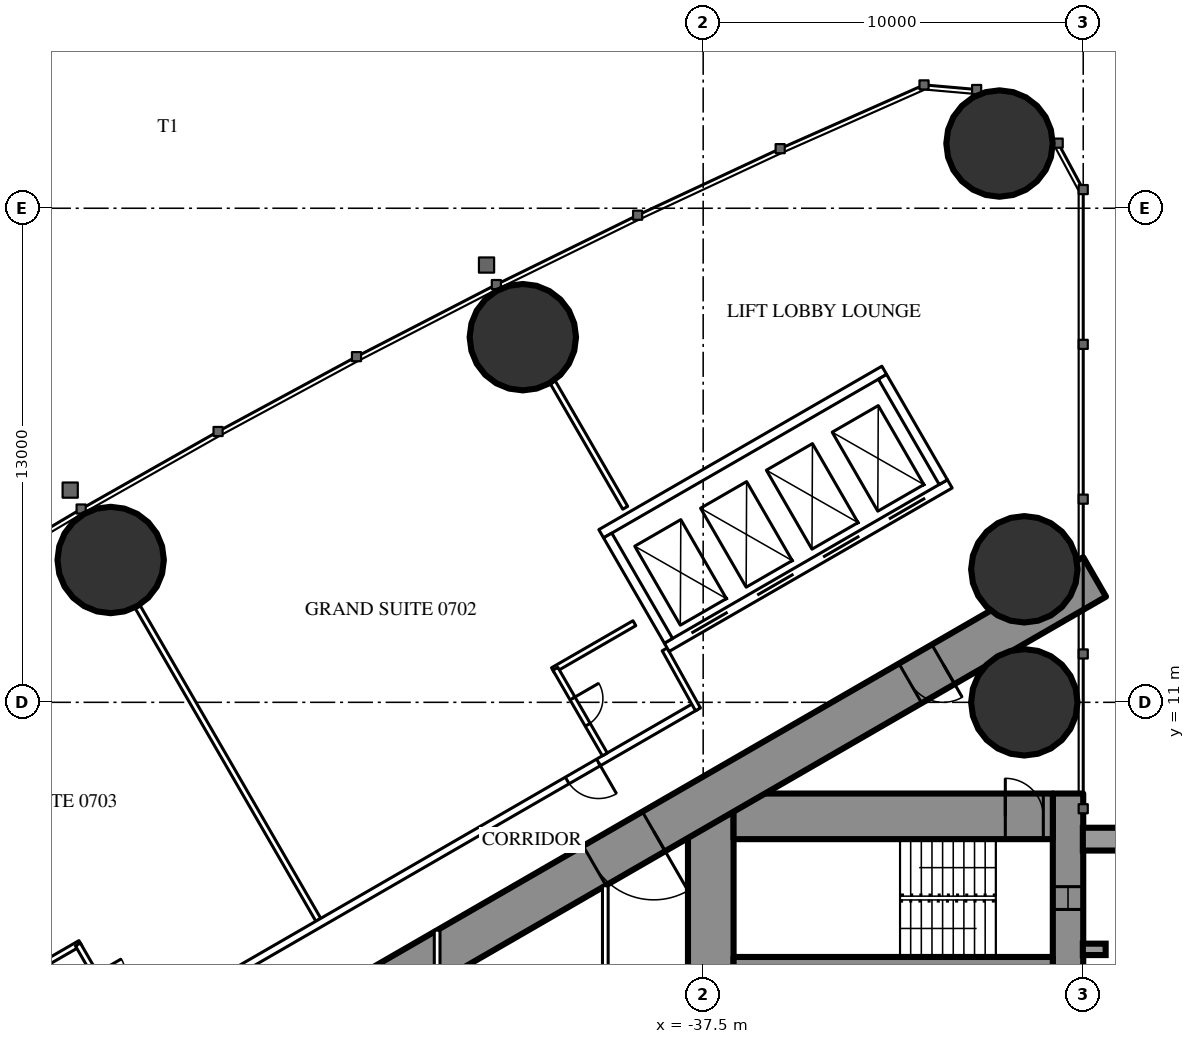
"""IFC4 building model, lengths in metres.
Left out: names, types, materials, properties, quantities, classifications, styles, units other than length and angle.
Written with IfcOpenShell. Run it as: python <this file> out.ifc"""

import sys

from ifc_helpers import new_model, si_unit, direction, frame, frame_2d, origin, origin_2d, place, context, subcontext, project, spatial, rectangle, hollow_circle, extrude, element, fill, save


model = new_model("IFC4")
c1 = context("Model", 3, precision=1e-05, world=origin(), true_north=direction((0.0, 1.0)))
c2 = subcontext(c1, "Body", "Model", "MODEL_VIEW")
j1 = project(units=[si_unit("LENGTHUNIT", "METRE"), si_unit("PLANEANGLEUNIT", "RADIAN")], contexts=[c1])
p1 = place(None, origin())
s1 = spatial("IfcSite", under=j1, at=p1, CompositionType="ELEMENT")
p2 = place(p1, origin())
s2 = spatial("IfcBuilding", under=s1, at=p2, CompositionType="ELEMENT")
p3 = place(p2, frame((0.0, 0.0, 32.0)))
s3 = spatial("IfcBuildingStorey", under=s2, at=p3, CompositionType="ELEMENT", Elevation=32.0)
for number, where, z_axis, x_axis in (
    (1, (-29.703, 25.703, 0.0), (0.0, 0.0, 1.0), (1.0, 0.0, 0.0)),
    (2, (-29.05, 11.0, 0.0), (0.0, 0.0, 1.0), (1.0, 0.0, 0.0)),
    (3, (-29.05, 14.5, 0.0), (0.0, 0.0, 1.0), (1.0, 0.0, 0.0)),
    (4, (-42.245, 20.607, 0.0), (0.0, 0.0, 1.0), (1.0, 0.0, 0.0)),
    (5, (-53.09, 14.745, 0.0), (0.0, 0.0, 1.0), (1.0, 0.0, 0.0)),
):
    element("IfcColumn", number, at=place(p3, frame(where, z_axis=z_axis, x_axis=x_axis)), inside=s3, PredefinedType="COLUMN", context=c2, shape_type="SweptSolid", body=[
        extrude(hollow_circle(Radius=1.4, WallThickness=0.12, at=origin_2d()), origin(), (0.0, 0.0, 1.0), 3.5),
    ])
p4 = place(p3, frame((-27.9, 8.6, 0.0), z_axis=(0.0, 0.0, 1.0), x_axis=(0.0, -1.0, 0.0)))
e6 = element("IfcWall", 6, at=p4, inside=s3, PredefinedType="SHEAR", context=c2, shape_type="SweptSolid", body=[
    extrude(rectangle(XDim=17.2, YDim=0.8, at=frame_2d((8.6, 0.0))), origin(), (0.0, 0.0, 1.0), 3.5),
])
p5 = place(p4, frame((2.45, 0.0, 0.6)))
e7 = element("IfcOpeningElement", 7, at=p5, cuts=e6, PredefinedType="OPENING", context=c2, shape_type="SweptSolid", body=[
    extrude(rectangle(XDim=0.6, YDim=2.1, at=frame_2d((0.3, 1.05))), frame((0.0, 0.41, 0.0), z_axis=(0.0, -1.0, 0.0), x_axis=(1.0, 0.0, 0.0)), (0.0, 0.0, 1.0), 0.82),
])
p6 = place(p4, frame((14.15, 0.0, 0.6)))
e8 = element("IfcOpeningElement", 8, at=p6, cuts=e6, PredefinedType="OPENING", context=c2, shape_type="SweptSolid", body=[
    extrude(rectangle(XDim=0.6, YDim=2.1, at=frame_2d((0.3, 1.05))), frame((0.0, 0.41, 0.0), z_axis=(0.0, -1.0, 0.0), x_axis=(1.0, 0.0, 0.0)), (0.0, 0.0, 1.0), 0.82),
])
p7 = place(p3, frame((-37.3, 8.6, 0.0), z_axis=(0.0, 0.0, 1.0), x_axis=(0.0, -1.0, 0.0)))
e9 = element("IfcWall", 9, at=p7, inside=s3, PredefinedType="SHEAR", context=c2, shape_type="SweptSolid", body=[
    extrude(rectangle(XDim=17.2, YDim=1.2, at=frame_2d((8.6, 0.0))), origin(), (0.0, 0.0, 1.0), 3.5),
])
p8 = place(p7, frame((7.7, 0.0, 0.0)))
e10 = element("IfcOpeningElement", 10, at=p8, cuts=e9, PredefinedType="OPENING", context=c2, shape_type="SweptSolid", body=[
    extrude(rectangle(XDim=1.8, YDim=2.2, at=frame_2d((0.9, 1.1))), frame((0.0, 0.61, 0.0), z_axis=(0.0, -1.0, 0.0), x_axis=(1.0, 0.0, 0.0)), (0.0, 0.0, 1.0), 1.22),
])
p9 = place(p3, frame((-28.3, 8.0, 0.0), z_axis=(0.0, 0.0, 1.0), x_axis=(-1.0, 0.0, 0.0)))
e11 = element("IfcWall", 11, at=p9, inside=s3, PredefinedType="SHEAR", context=c2, shape_type="SweptSolid", body=[
    extrude(rectangle(XDim=8.4, YDim=1.2, at=frame_2d((4.2, 0.0))), origin(), (0.0, 0.0, 1.0), 3.5),
])
p10 = place(p9, frame((0.25, 0.0, 0.0)))
e12 = element("IfcOpeningElement", 12, at=p10, cuts=e11, PredefinedType="OPENING", context=c2, shape_type="SweptSolid", body=[
    extrude(rectangle(XDim=1.0, YDim=2.2, at=frame_2d((0.5, 1.1))), frame((0.0, 0.61, 0.0), z_axis=(0.0, -1.0, 0.0), x_axis=(1.0, 0.0, 0.0)), (0.0, 0.0, 1.0), 1.22),
])
p11 = place(p3, frame((-28.3, 4.15, 0.0), z_axis=(0.0, 0.0, 1.0), x_axis=(-1.0, 0.0, 0.0)))
e13 = element("IfcWall", 13, at=p11, inside=s3, PredefinedType="SHEAR", context=c2, shape_type="SweptSolid", body=[
    extrude(rectangle(XDim=8.4, YDim=0.3, at=frame_2d((4.2, 0.0))), origin(), (0.0, 0.0, 1.0), 3.5),
])
p12 = place(p3, frame((-27.2, 14.3, 0.0), z_axis=(0.0, 0.0, 1.0), x_axis=(-0.866026593062, -0.499997940104, 0.0)))
e14 = element("IfcWall", 14, at=p12, inside=s3, PredefinedType="SHEAR", context=c2, shape_type="SweptSolid", body=[
    extrude(rectangle(XDim=28.946, YDim=1.2, at=frame_2d((14.473, 0.0))), origin(), (0.0, 0.0, 1.0), 3.5),
])
p13 = place(p12, frame((4.6, 0.0, 0.0)))
e15 = element("IfcOpeningElement", 15, at=p13, cuts=e14, PredefinedType="OPENING", context=c2, shape_type="SweptSolid", body=[
    extrude(rectangle(XDim=1.0, YDim=2.2, at=frame_2d((0.5, 1.1))), frame((0.0, 0.61, 0.0), z_axis=(0.0, -1.0, 0.0), x_axis=(1.0, 0.0, 0.0)), (0.0, 0.0, 1.0), 1.22),
])
p14 = place(p12, frame((13.395, 0.0, 0.0)))
e16 = element("IfcOpeningElement", 16, at=p14, cuts=e14, PredefinedType="OPENING", context=c2, shape_type="SweptSolid", body=[
    extrude(rectangle(XDim=1.8, YDim=2.2, at=frame_2d((0.9, 1.1))), frame((0.0, 0.61, 0.0), z_axis=(0.0, -1.0, 0.0), x_axis=(1.0, 0.0, 0.0)), (0.0, 0.0, 1.0), 1.22),
])
p15 = place(p3, frame((-47.627, 5.278, 0.0), z_axis=(0.0, 0.0, 1.0), x_axis=(-0.500009844318, 0.86601972009, 0.0)))
e17 = element("IfcWall", 17, at=p15, inside=s3, PredefinedType="PARTITIONING", context=c2, shape_type="SweptSolid", body=[
    extrude(rectangle(XDim=9.51, YDim=0.15, at=frame_2d((4.755, 0.0))), origin(), (0.0, 0.0, 1.0), 2.25),
])
p16 = place(p3, frame((-39.551, 16.119, 0.0), z_axis=(0.0, 0.0, 1.0), x_axis=(-0.500014214979, 0.866017196607, 0.0)))
e18 = element("IfcWall", 18, at=p16, inside=s3, PredefinedType="PARTITIONING", context=c2, shape_type="SweptSolid", body=[
    extrude(rectangle(XDim=3.815, YDim=0.15, at=frame_2d((1.907, 0.0))), origin(), (0.0, 0.0, 1.0), 3.25),
])
p17 = place(p3, frame((-37.7, 10.894, 0.0), z_axis=(0.0, 0.0, 1.0), x_axis=(-0.866027905338, -0.499995667157, 0.0)))
e19 = element("IfcWall", 19, at=p17, inside=s3, PredefinedType="PARTITIONING", context=c2, shape_type="SweptSolid", body=[
    extrude(rectangle(XDim=21.787, YDim=0.2, at=frame_2d((10.894, 0.0))), origin(), (0.0, 0.0, 1.0), 3.25),
])
p18 = place(p17, frame((16.008, 0.0, 0.0)))
e20 = element("IfcOpeningElement", 20, at=p18, cuts=e19, PredefinedType="OPENING", context=c2, shape_type="SweptSolid", body=[
    extrude(rectangle(XDim=0.95, YDim=2.2, at=frame_2d((0.475, 1.1))), frame((0.0, 0.11, 0.0), z_axis=(0.0, -1.0, 0.0), x_axis=(1.0, 0.0, 0.0)), (0.0, 0.0, 1.0), 0.22),
])
p19 = place(p17, frame((20.058, 0.0, 0.0)))
e21 = element("IfcOpeningElement", 21, at=p19, cuts=e19, PredefinedType="OPENING", context=c2, shape_type="SweptSolid", body=[
    extrude(rectangle(XDim=0.95, YDim=2.2, at=frame_2d((0.475, 1.1))), frame((0.0, 0.11, 0.0), z_axis=(0.0, -1.0, 0.0), x_axis=(1.0, 0.0, 0.0)), (0.0, 0.0, 1.0), 0.22),
])
p20 = place(p17, frame((2.95, 0.0, 0.0)))
e22 = element("IfcOpeningElement", 22, at=p20, cuts=e19, PredefinedType="OPENING", context=c2, shape_type="SweptSolid", body=[
    extrude(rectangle(XDim=0.95, YDim=2.2, at=frame_2d((0.475, 1.1))), frame((0.0, 0.11, 0.0), z_axis=(0.0, -1.0, 0.0), x_axis=(1.0, 0.0, 0.0)), (0.0, 0.0, 1.0), 0.22),
])
p21 = place(p3, frame((-38.513, 12.392, 0.0), z_axis=(0.0, 0.0, 1.0), x_axis=(0.485585508183, -0.874189175317, 0.0)))
e23 = element("IfcWall", 23, at=p21, inside=s3, PredefinedType="PARTITIONING", context=c2, shape_type="SweptSolid", body=[
    extrude(rectangle(XDim=1.805, YDim=0.15, at=frame_2d((0.902, 0.0))), origin(), (0.0, 0.0, 1.0), 3.25),
])
p22 = place(p3, frame((-53.888, 4.665, 0.0), z_axis=(0.0, 0.0, 1.0), x_axis=(-0.866006523861, -0.500032699561, 0.0)))
e24 = element("IfcWall", 24, at=p22, inside=s3, PredefinedType="PARTITIONING", context=c2, shape_type="SweptSolid", body=[
    extrude(rectangle(XDim=2.475, YDim=0.15, at=frame_2d((1.237, 0.0))), origin(), (0.0, 0.0, 1.0), 3.25),
])
p23 = place(p3, frame((-52.653, 2.376, 0.0), z_axis=(0.0, 0.0, 1.0), x_axis=(-0.500006934395, 0.866021400173, 0.0)))
e25 = element("IfcWall", 25, at=p23, inside=s3, PredefinedType="PARTITIONING", context=c2, shape_type="SweptSolid", body=[
    extrude(rectangle(XDim=2.6, YDim=0.15, at=frame_2d((1.3, 0.0))), origin(), (0.0, 0.0, 1.0), 3.25),
])
p24 = place(p23, frame((0.9, 0.0, 0.0)))
e26 = element("IfcOpeningElement", 26, at=p24, cuts=e25, PredefinedType="OPENING", context=c2, shape_type="SweptSolid", body=[
    extrude(rectangle(XDim=0.8, YDim=2.2, at=frame_2d((0.4, 1.1))), frame((0.0, 0.085, 0.0), z_axis=(0.0, -1.0, 0.0), x_axis=(1.0, 0.0, 0.0)), (0.0, 0.0, 1.0), 0.17),
])
p25 = place(p3, frame((-39.31, 13.082, 0.0), z_axis=(0.0, 0.0, 1.0), x_axis=(-0.866031185235, -0.4999899861, 0.0)))
e27 = element("IfcWall", 27, at=p25, inside=s3, PredefinedType="PARTITIONING", context=c2, shape_type="SweptSolid", body=[
    extrude(rectangle(XDim=2.475, YDim=0.15, at=frame_2d((1.238, 0.0))), origin(), (0.0, 0.0, 1.0), 3.25),
])
p26 = place(p3, frame((-40.088, 9.63, 0.0), z_axis=(0.0, 0.0, 1.0), x_axis=(-0.500006934395, 0.866021400173, 0.0)))
e28 = element("IfcWall", 28, at=p26, inside=s3, PredefinedType="PARTITIONING", context=c2, shape_type="SweptSolid", body=[
    extrude(rectangle(XDim=2.6, YDim=0.15, at=frame_2d((1.3, 0.0))), origin(), (0.0, 0.0, 1.0), 3.25),
])
p27 = place(p26, frame((0.9, 0.0, 0.0)))
e29 = element("IfcOpeningElement", 29, at=p27, cuts=e28, PredefinedType="OPENING", context=c2, shape_type="SweptSolid", body=[
    extrude(rectangle(XDim=0.8, YDim=2.2, at=frame_2d((0.4, 1.1))), frame((0.0, 0.085, 0.0), z_axis=(0.0, -1.0, 0.0), x_axis=(1.0, 0.0, 0.0)), (0.0, 0.0, 1.0), 0.17),
])
p28 = place(p3, frame((-40.075, 6.174, 0.0), z_axis=(0.0, 0.0, 1.0), x_axis=(0.0, -1.0, 0.0)))
e30 = element("IfcWall", 30, at=p28, inside=s3, PredefinedType="PARTITIONING", context=c2, shape_type="SweptSolid", body=[
    extrude(rectangle(XDim=7.374, YDim=0.15, at=frame_2d((3.687, 0.0))), origin(), (0.0, 0.0, 1.0), 3.25),
])
p29 = place(p28, frame((2.787, 0.0, 0.0)))
e31 = element("IfcOpeningElement", 31, at=p29, cuts=e30, PredefinedType="OPENING", context=c2, shape_type="SweptSolid", body=[
    extrude(rectangle(XDim=1.8, YDim=2.2, at=frame_2d((0.9, 1.1))), frame((0.0, 0.085, 0.0), z_axis=(0.0, -1.0, 0.0), x_axis=(1.0, 0.0, 0.0)), (0.0, 0.0, 1.0), 0.17),
])
p30 = place(p3, frame((-44.5, 5.005, 0.0), z_axis=(0.0, 0.0, 1.0), x_axis=(0.0, -1.0, 0.0)))
e32 = element("IfcWall", 32, at=p30, inside=s3, PredefinedType="PARTITIONING", context=c2, shape_type="SweptSolid", body=[
    extrude(rectangle(XDim=10.009, YDim=0.15, at=frame_2d((5.005, 0.0))), origin(), (0.0, 0.0, 1.0), 2.45),
])
p31 = place(p30, frame((2.002, 0.0, 0.0)))
e33 = element("IfcOpeningElement", 33, at=p31, cuts=e32, PredefinedType="OPENING", context=c2, shape_type="SweptSolid", body=[
    extrude(rectangle(XDim=1.0, YDim=2.2, at=frame_2d((0.5, 1.1))), frame((0.0, 0.085, 0.0), z_axis=(0.0, -1.0, 0.0), x_axis=(1.0, 0.0, 0.0)), (0.0, 0.0, 1.0), 0.17),
])
p32 = place(p30, frame((7.007, 0.0, 0.0)))
e34 = element("IfcOpeningElement", 34, at=p32, cuts=e32, PredefinedType="OPENING", context=c2, shape_type="SweptSolid", body=[
    extrude(rectangle(XDim=1.0, YDim=2.2, at=frame_2d((0.5, 1.1))), frame((0.0, 0.085, 0.0), z_axis=(0.0, -1.0, 0.0), x_axis=(1.0, 0.0, 0.0)), (0.0, 0.0, 1.0), 0.17),
])
p33 = place(p3, frame((-31.01, 16.747, 0.0), z_axis=(0.0, 0.0, 1.0), x_axis=(-0.866028165386, -0.499995216735, 0.0)))
e35 = element("IfcWall", 35, at=p33, inside=s3, PredefinedType="PARTITIONING", context=c2, shape_type="SweptSolid", body=[
    extrude(rectangle(XDim=8.6, YDim=0.25, at=frame_2d((4.3, 0.0))), origin(), (0.0, 0.0, 1.0), 3.25),
])
p34 = place(p33, frame((0.75, 0.0, 0.0)))
e36 = element("IfcOpeningElement", 36, at=p34, cuts=e35, PredefinedType="OPENING", context=c2, shape_type="SweptSolid", body=[
    extrude(rectangle(XDim=1.1, YDim=2.2, at=frame_2d((0.55, 1.1))), frame((0.0, 0.135, 0.0), z_axis=(0.0, -1.0, 0.0), x_axis=(1.0, 0.0, 0.0)), (0.0, 0.0, 1.0), 0.27),
])
p35 = place(p33, frame((2.75, 0.0, 0.0)))
e37 = element("IfcOpeningElement", 37, at=p35, cuts=e35, PredefinedType="OPENING", context=c2, shape_type="SweptSolid", body=[
    extrude(rectangle(XDim=1.1, YDim=2.2, at=frame_2d((0.55, 1.1))), frame((0.0, 0.135, 0.0), z_axis=(0.0, -1.0, 0.0), x_axis=(1.0, 0.0, 0.0)), (0.0, 0.0, 1.0), 0.27),
])
p36 = place(p33, frame((4.75, 0.0, 0.0)))
e38 = element("IfcOpeningElement", 38, at=p36, cuts=e35, PredefinedType="OPENING", context=c2, shape_type="SweptSolid", body=[
    extrude(rectangle(XDim=1.1, YDim=2.2, at=frame_2d((0.55, 1.1))), frame((0.0, 0.135, 0.0), z_axis=(0.0, -1.0, 0.0), x_axis=(1.0, 0.0, 0.0)), (0.0, 0.0, 1.0), 0.27),
])
p37 = place(p33, frame((6.75, 0.0, 0.0)))
e39 = element("IfcOpeningElement", 39, at=p37, cuts=e35, PredefinedType="OPENING", context=c2, shape_type="SweptSolid", body=[
    extrude(rectangle(XDim=1.1, YDim=2.2, at=frame_2d((0.55, 1.1))), frame((0.0, 0.135, 0.0), z_axis=(0.0, -1.0, 0.0), x_axis=(1.0, 0.0, 0.0)), (0.0, 0.0, 1.0), 0.27),
])
p38 = place(p3, frame((-32.736, 19.736, 0.0), z_axis=(0.0, 0.0, 1.0), x_axis=(-0.866028165386, -0.499995216735, 0.0)))
e40 = element("IfcWall", 40, at=p38, inside=s3, PredefinedType="PARTITIONING", context=c2, shape_type="SweptSolid", body=[
    extrude(rectangle(XDim=8.6, YDim=0.25, at=frame_2d((4.3, 0.0))), origin(), (0.0, 0.0, 1.0), 3.25),
])
p39 = place(p3, frame((-31.181, 16.793, 0.0), z_axis=(0.0, 0.0, 1.0), x_axis=(-0.499929347863, 0.866066190972, 0.0)))
e41 = element("IfcWall", 41, at=p39, inside=s3, PredefinedType="PARTITIONING", context=c2, shape_type="SweptSolid", body=[
    extrude(rectangle(XDim=3.201, YDim=0.25, at=frame_2d((1.6, 0.0))), origin(), (0.0, 0.0, 1.0), 3.25),
])
p40 = place(p3, frame((-38.413, 12.618, 0.0), z_axis=(0.0, 0.0, 1.0), x_axis=(-0.499872130319, 0.866099216793, 0.0)))
e42 = element("IfcWall", 42, at=p40, inside=s3, PredefinedType="PARTITIONING", context=c2, shape_type="SweptSolid", body=[
    extrude(rectangle(XDim=3.2, YDim=0.25, at=frame_2d((1.6, 0.0))), origin(), (0.0, 0.0, 1.0), 3.25),
])
p41 = place(p27, origin())
e43 = element("IfcDoor", 43, at=p41, inside=s3, OperationType="SINGLE_SWING_RIGHT", PredefinedType="DOOR", context=c2, shape_type="SweptSolid", body=[
    extrude(rectangle(XDim=0.8, YDim=2.2, at=frame_2d((0.4, 1.1))), frame((0.0, 0.025, 0.0), z_axis=(0.0, -1.0, 0.0), x_axis=(1.0, 0.0, 0.0)), (0.0, 0.0, 1.0), 0.05),
])
fill(e29, e43)
p42 = place(p20, origin())
e44 = element("IfcDoor", 44, at=p42, inside=s3, OperationType="SINGLE_SWING_LEFT", PredefinedType="DOOR", context=c2, shape_type="SweptSolid", body=[
    extrude(rectangle(XDim=0.95, YDim=2.2, at=frame_2d((0.475, 1.1))), frame((0.0, 0.025, 0.0), z_axis=(0.0, -1.0, 0.0), x_axis=(1.0, 0.0, 0.0)), (0.0, 0.0, 1.0), 0.05),
])
fill(e22, e44)
p43 = place(p13, origin())
e45 = element("IfcDoor", 45, at=p43, inside=s3, OperationType="SINGLE_SWING_LEFT", PredefinedType="DOOR", context=c2, shape_type="SweptSolid", body=[
    extrude(rectangle(XDim=1.0, YDim=2.2, at=frame_2d((0.5, 1.1))), frame((0.0, 0.025, 0.0), z_axis=(0.0, -1.0, 0.0), x_axis=(1.0, 0.0, 0.0)), (0.0, 0.0, 1.0), 0.05),
])
fill(e15, e45)
p44 = place(p14, origin())
e46 = element("IfcDoor", 46, at=p44, inside=s3, OperationType="DOUBLE_DOOR_SINGLE_SWING", PredefinedType="DOOR", context=c2, shape_type="SweptSolid", body=[
    extrude(rectangle(XDim=1.8, YDim=2.2, at=frame_2d((0.9, 1.1))), frame((0.0, 0.025, 0.0), z_axis=(0.0, -1.0, 0.0), x_axis=(1.0, 0.0, 0.0)), (0.0, 0.0, 1.0), 0.05),
])
fill(e16, e46)
p45 = place(p10, origin())
e47 = element("IfcDoor", 47, at=p45, inside=s3, OperationType="SINGLE_SWING_RIGHT", PredefinedType="DOOR", context=c2, shape_type="SweptSolid", body=[
    extrude(rectangle(XDim=1.0, YDim=2.2, at=frame_2d((0.5, 1.1))), frame((0.0, 0.025, 0.0), z_axis=(0.0, -1.0, 0.0), x_axis=(1.0, 0.0, 0.0)), (0.0, 0.0, 1.0), 0.05),
])
fill(e12, e47)
p46 = place(p34, origin())
e48 = element("IfcDoor", 48, at=p46, inside=s3, OperationType="DOUBLE_DOOR_SLIDING", PredefinedType="USERDEFINED", context=c2, shape_type="SweptSolid", body=[
    extrude(rectangle(XDim=1.1, YDim=2.2, at=frame_2d((0.55, 1.1))), frame((0.0, 0.025, 0.0), z_axis=(0.0, -1.0, 0.0), x_axis=(1.0, 0.0, 0.0)), (0.0, 0.0, 1.0), 0.05),
])
fill(e36, e48)
p47 = place(p35, origin())
e49 = element("IfcDoor", 49, at=p47, inside=s3, OperationType="DOUBLE_DOOR_SLIDING", PredefinedType="USERDEFINED", context=c2, shape_type="SweptSolid", body=[
    extrude(rectangle(XDim=1.1, YDim=2.2, at=frame_2d((0.55, 1.1))), frame((0.0, 0.025, 0.0), z_axis=(0.0, -1.0, 0.0), x_axis=(1.0, 0.0, 0.0)), (0.0, 0.0, 1.0), 0.05),
])
fill(e37, e49)
p48 = place(p36, origin())
e50 = element("IfcDoor", 50, at=p48, inside=s3, OperationType="DOUBLE_DOOR_SLIDING", PredefinedType="USERDEFINED", context=c2, shape_type="SweptSolid", body=[
    extrude(rectangle(XDim=1.1, YDim=2.2, at=frame_2d((0.55, 1.1))), frame((0.0, 0.025, 0.0), z_axis=(0.0, -1.0, 0.0), x_axis=(1.0, 0.0, 0.0)), (0.0, 0.0, 1.0), 0.05),
])
fill(e38, e50)
p49 = place(p37, origin())
e51 = element("IfcDoor", 51, at=p49, inside=s3, OperationType="DOUBLE_DOOR_SLIDING", PredefinedType="USERDEFINED", context=c2, shape_type="SweptSolid", body=[
    extrude(rectangle(XDim=1.1, YDim=2.2, at=frame_2d((0.55, 1.1))), frame((0.0, 0.025, 0.0), z_axis=(0.0, -1.0, 0.0), x_axis=(1.0, 0.0, 0.0)), (0.0, 0.0, 1.0), 0.05),
])
fill(e39, e51)
p50 = place(p5, origin())
e52 = element("IfcWindow", 52, at=p50, inside=s3, PartitioningType="SINGLE_PANEL", PredefinedType="WINDOW", context=c2, shape_type="SweptSolid", body=[
    extrude(rectangle(XDim=0.6, YDim=2.1, at=frame_2d((0.3, 1.05))), frame((0.0, 0.03, 0.0), z_axis=(0.0, -1.0, 0.0), x_axis=(1.0, 0.0, 0.0)), (0.0, 0.0, 1.0), 0.06),
])
fill(e7, e52)
save(model, sys.argv[1])
